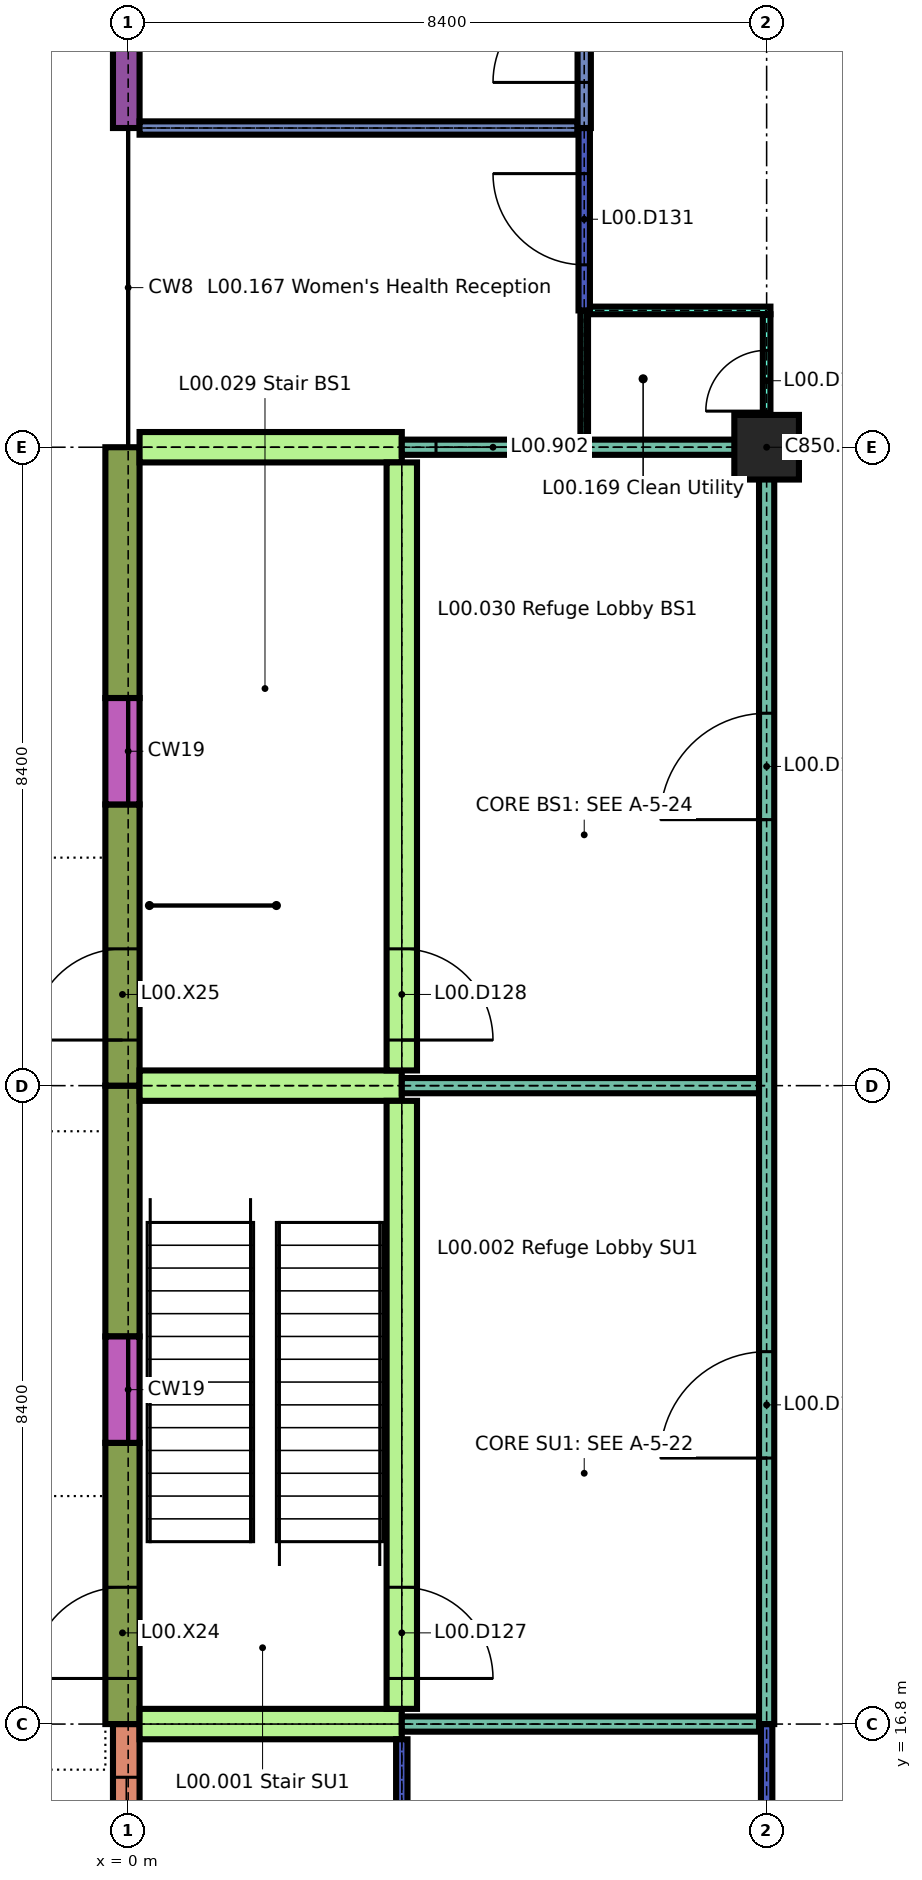
"""IFC4 building model, lengths in metres.
Left out: names, types, materials, properties, quantities, classifications, styles, units other than length and angle.
Written with IfcOpenShell. Run it as: python <this file> out.ifc"""

import sys

from ifc_helpers import new_model, si_unit, direction, frame, frame_2d, origin, origin_2d, place, context, subcontext, project, spatial, rectangle, extrude, element, fill, save


model = new_model("IFC4")
c1 = context("Model", 3, precision=1e-05, world=origin(), true_north=direction((0.0, 1.0)))
c2 = subcontext(c1, "Body", "Model", "MODEL_VIEW")
j1 = project(units=[si_unit("LENGTHUNIT", "METRE"), si_unit("PLANEANGLEUNIT", "RADIAN")], contexts=[c1])
p1 = place(None, origin())
s1 = spatial("IfcSite", under=j1, at=p1, CompositionType="ELEMENT")
p2 = place(p1, origin())
s2 = spatial("IfcBuilding", under=s1, at=p2, CompositionType="ELEMENT")
p3 = place(p2, origin())
s3 = spatial("IfcBuildingStorey", under=s2, at=p3, CompositionType="ELEMENT", Elevation=0.0)
p4 = place(p3, frame((-0.025, 12.6, 0.0), z_axis=(0.0, 0.0, 1.0), x_axis=(0.0, 1.0, 0.0)))
e1 = element("IfcWall", 1, at=p4, inside=s3, PredefinedType="SOLIDWALL", context=c2, shape_type="SweptSolid", body=[
    extrude(rectangle(XDim=4.2, YDim=0.35, at=frame_2d((2.1, 0.0))), origin(), (0.0, 0.0, 1.0), 4.14),
])
p5 = place(p4, frame((0.7, 0.0, 1.0)))
e2 = element("IfcOpeningElement", 2, at=p5, cuts=e1, PredefinedType="OPENING", context=c2, shape_type="SweptSolid", body=[
    extrude(rectangle(XDim=2.8, YDim=1.5, at=frame_2d((1.4, 0.75))), frame((0.0, 0.185, 0.0), z_axis=(0.0, -1.0, 0.0), x_axis=(1.0, 0.0, 0.0)), (0.0, 0.0, 1.0), 0.37),
])
p6 = place(p3, frame((-0.075, 16.8, 0.0), z_axis=(0.0, 0.0, 1.0), x_axis=(0.0, 1.0, 0.0)))
e3 = element("IfcWall", 3, at=p6, inside=s3, PredefinedType="SOLIDWALL", context=c2, shape_type="SweptSolid", body=[
    extrude(rectangle(XDim=3.7, YDim=0.45, at=frame_2d((1.85, 0.0))), origin(), (0.0, 0.0, 1.0), 4.14),
])
p7 = place(p6, frame((0.6, 0.0, 0.0)))
e4 = element("IfcOpeningElement", 4, at=p7, cuts=e3, PredefinedType="OPENING", context=c2, shape_type="SweptSolid", body=[
    extrude(rectangle(XDim=1.2, YDim=2.1, at=frame_2d((0.6, 1.05))), frame((0.0, 0.235, 0.0), z_axis=(0.0, -1.0, 0.0), x_axis=(1.0, 0.0, 0.0)), (0.0, 0.0, 1.0), 0.47),
])
p8 = place(p3, frame((-0.075, 21.9, 0.0), z_axis=(0.0, 0.0, 1.0), x_axis=(0.0, 1.0, 0.0)))
e5 = element("IfcWall", 5, at=p8, inside=s3, PredefinedType="SOLIDWALL", context=c2, shape_type="SweptSolid", body=[
    extrude(rectangle(XDim=3.3, YDim=0.45, at=frame_2d((1.65, 0.0))), origin(), (0.0, 0.0, 1.0), 4.14),
])
p9 = place(p3, frame((-0.075, 20.5, 0.0), z_axis=(0.0, 0.0, 1.0), x_axis=(0.0, 1.0, 0.0)))
e6 = element("IfcWall", 6, at=p9, inside=s3, PredefinedType="SOLIDWALL", context=c2, shape_type="SweptSolid", body=[
    extrude(rectangle(XDim=1.4, YDim=0.45, at=frame_2d((0.7, 0.0))), origin(), (0.0, 0.0, 1.0), 0.6),
])
p10 = place(p3, frame((-0.075, 25.2, 0.0), z_axis=(0.0, 0.0, 1.0), x_axis=(0.0, 1.0, 0.0)))
e7 = element("IfcWall", 7, at=p10, inside=s3, PredefinedType="SOLIDWALL", context=c2, shape_type="SweptSolid", body=[
    extrude(rectangle(XDim=3.7, YDim=0.45, at=frame_2d((1.85, 0.0))), origin(), (0.0, 0.0, 1.0), 4.14),
])
p11 = place(p10, frame((0.6, 0.0, 0.0)))
e8 = element("IfcOpeningElement", 8, at=p11, cuts=e7, PredefinedType="OPENING", context=c2, shape_type="SweptSolid", body=[
    extrude(rectangle(XDim=1.2, YDim=2.1, at=frame_2d((0.6, 1.05))), frame((0.0, 0.235, 0.0), z_axis=(0.0, -1.0, 0.0), x_axis=(1.0, 0.0, 0.0)), (0.0, 0.0, 1.0), 0.47),
])
p12 = place(p3, frame((-0.075, 30.3, 0.0), z_axis=(0.0, 0.0, 1.0), x_axis=(0.0, 1.0, 0.0)))
e9 = element("IfcWall", 9, at=p12, inside=s3, PredefinedType="SOLIDWALL", context=c2, shape_type="SweptSolid", body=[
    extrude(rectangle(XDim=3.3, YDim=0.45, at=frame_2d((1.65, 0.0))), origin(), (0.0, 0.0, 1.0), 4.14),
])
p13 = place(p3, frame((-0.075, 28.9, 0.0), z_axis=(0.0, 0.0, 1.0), x_axis=(0.0, 1.0, 0.0)))
e10 = element("IfcWall", 10, at=p13, inside=s3, PredefinedType="SOLIDWALL", context=c2, shape_type="SweptSolid", body=[
    extrude(rectangle(XDim=1.4, YDim=0.45, at=frame_2d((0.7, 0.0))), origin(), (0.0, 0.0, 1.0), 0.6),
])
p14 = place(p3, frame((-0.025, 37.8, 0.0), z_axis=(0.0, 0.0, 1.0), x_axis=(0.0, 1.0, 0.0)))
e11 = element("IfcWall", 11, at=p14, inside=s3, PredefinedType="SOLIDWALL", context=c2, shape_type="SweptSolid", body=[
    extrude(rectangle(XDim=3.775, YDim=0.35, at=frame_2d((1.887, 0.0))), origin(), (0.0, 0.0, 1.0), 3.84),
])
p15 = place(p14, frame((1.05, 0.0, 0.9)))
e12 = element("IfcOpeningElement", 12, at=p15, cuts=e11, PredefinedType="OPENING", context=c2, shape_type="SweptSolid", body=[
    extrude(rectangle(XDim=2.1, YDim=2.1, at=frame_2d((1.05, 1.05))), frame((0.0, 0.185, 0.0), z_axis=(0.0, -1.0, 0.0), x_axis=(1.0, 0.0, 0.0)), (0.0, 0.0, 1.0), 0.37),
])
p16 = place(p3, frame((0.15, 16.8, 0.0), z_axis=(0.0, 0.0, 1.0), x_axis=(1.0, 0.0, 0.0)))
e13 = element("IfcWall", 13, at=p16, inside=s3, PredefinedType="SHEAR", context=c2, shape_type="SweptSolid", body=[
    extrude(rectangle(XDim=3.45, YDim=0.4, at=frame_2d((1.725, 0.0))), origin(), (0.0, 0.0, 1.0), 4.14),
])
p17 = place(p3, frame((3.6, 16.8, 0.0), z_axis=(0.0, 0.0, 1.0), x_axis=(1.0, 0.0, 0.0)))
e14 = element("IfcWall", 14, at=p17, inside=s3, PredefinedType="PARTITIONING", context=c2, shape_type="SweptSolid", body=[
    extrude(rectangle(XDim=4.7, YDim=0.2, at=frame_2d((2.35, 0.0))), origin(), (0.0, 0.0, 1.0), 4.14),
])
p18 = place(p3, frame((0.15, 25.2, 0.0), z_axis=(0.0, 0.0, 1.0), x_axis=(1.0, 0.0, 0.0)))
e15 = element("IfcWall", 15, at=p18, inside=s3, PredefinedType="SHEAR", context=c2, shape_type="SweptSolid", body=[
    extrude(rectangle(XDim=3.45, YDim=0.4, at=frame_2d((1.725, 0.0))), origin(), (0.0, 0.0, 1.0), 4.14),
])
p19 = place(p3, frame((3.6, 25.2, 0.0), z_axis=(0.0, 0.0, 1.0), x_axis=(1.0, 0.0, 0.0)))
e16 = element("IfcWall", 16, at=p19, inside=s3, PredefinedType="PARTITIONING", context=c2, shape_type="SweptSolid", body=[
    extrude(rectangle(XDim=4.7, YDim=0.2, at=frame_2d((2.35, 0.0))), origin(), (0.0, 0.0, 1.0), 4.14),
])
p20 = place(p3, frame((0.15, 33.6, 0.0), z_axis=(0.0, 0.0, 1.0), x_axis=(1.0, 0.0, 0.0)))
e17 = element("IfcWall", 17, at=p20, inside=s3, PredefinedType="SHEAR", context=c2, shape_type="SweptSolid", body=[
    extrude(rectangle(XDim=3.45, YDim=0.4, at=frame_2d((1.725, 0.0))), origin(), (0.0, 0.0, 1.0), 4.14),
])
p21 = place(p3, frame((3.6, 33.6, 0.0), z_axis=(0.0, 0.0, 1.0), x_axis=(1.0, 0.0, 0.0)))
e18 = element("IfcWall", 18, at=p21, inside=s3, PredefinedType="PARTITIONING", context=c2, shape_type="SweptSolid", body=[
    extrude(rectangle(XDim=4.7, YDim=0.2, at=frame_2d((2.35, 0.0))), origin(), (0.0, 0.0, 1.0), 4.14),
])
p22 = place(p21, frame((0.45, 0.0, 0.9)))
e19 = element("IfcOpeningElement", 19, at=p22, cuts=e18, PredefinedType="OPENING", context=c2, shape_type="SweptSolid", body=[
    extrude(rectangle(XDim=1.5, YDim=1.0, at=frame_2d((0.75, 0.5))), frame((0.0, 0.11, 0.0), z_axis=(0.0, -1.0, 0.0), x_axis=(1.0, 0.0, 0.0)), (0.0, 0.0, 1.0), 0.22),
])
p23 = place(p3, frame((6.075, 35.4, 0.0), z_axis=(0.0, 0.0, 1.0), x_axis=(1.0, 0.0, 0.0)))
e20 = element("IfcWall", 20, at=p23, inside=s3, PredefinedType="PARTITIONING", context=c2, shape_type="SweptSolid", body=[
    extrude(rectangle(XDim=2.375, YDim=0.1, at=frame_2d((1.188, 0.0))), origin(), (0.0, 0.0, 1.0), 4.14),
])
p24 = place(p3, frame((0.15, 37.8, 0.0), z_axis=(0.0, 0.0, 1.0), x_axis=(1.0, 0.0, 0.0)))
e21 = element("IfcWall", 21, at=p24, inside=s3, PredefinedType="PARTITIONING", context=c2, shape_type="SweptSolid", body=[
    extrude(rectangle(XDim=5.763, YDim=0.175, at=frame_2d((2.881, 0.0))), origin(), (0.0, 0.0, 1.0), 4.14),
])
p25 = place(p3, frame((3.6, 12.675, 0.0), z_axis=(0.0, 0.0, 1.0), x_axis=(0.0, 1.0, 0.0)))
e22 = element("IfcWall", 22, at=p25, inside=s3, PredefinedType="PARTITIONING", context=c2, shape_type="SweptSolid", body=[
    extrude(rectangle(XDim=3.925, YDim=0.15, at=frame_2d((1.962, 0.0))), origin(), (0.0, 0.0, 1.0), 4.14),
])
p26 = place(p3, frame((3.6, 17.0, 0.0), z_axis=(0.0, 0.0, 1.0), x_axis=(0.0, 1.0, 0.0)))
e23 = element("IfcWall", 23, at=p26, inside=s3, PredefinedType="SHEAR", context=c2, shape_type="SweptSolid", body=[
    extrude(rectangle(XDim=8.0, YDim=0.4, at=frame_2d((4.0, 0.0))), origin(), (0.0, 0.0, 1.0), 4.14),
])
p27 = place(p26, frame((0.4, 0.0, 0.0)))
e24 = element("IfcOpeningElement", 24, at=p27, cuts=e23, PredefinedType="OPENING", context=c2, shape_type="SweptSolid", body=[
    extrude(rectangle(XDim=1.2, YDim=2.1, at=frame_2d((0.6, 1.05))), frame((0.0, 0.21, 0.0), z_axis=(0.0, -1.0, 0.0), x_axis=(1.0, 0.0, 0.0)), (0.0, 0.0, 1.0), 0.42),
])
p28 = place(p3, frame((3.6, 25.4, 0.0), z_axis=(0.0, 0.0, 1.0), x_axis=(0.0, 1.0, 0.0)))
e25 = element("IfcWall", 25, at=p28, inside=s3, PredefinedType="SHEAR", context=c2, shape_type="SweptSolid", body=[
    extrude(rectangle(XDim=8.0, YDim=0.4, at=frame_2d((4.0, 0.0))), origin(), (0.0, 0.0, 1.0), 4.14),
])
p29 = place(p28, frame((0.4, 0.0, 0.0)))
e26 = element("IfcOpeningElement", 26, at=p29, cuts=e25, PredefinedType="OPENING", context=c2, shape_type="SweptSolid", body=[
    extrude(rectangle(XDim=1.2, YDim=2.1, at=frame_2d((0.6, 1.05))), frame((0.0, 0.21, 0.0), z_axis=(0.0, -1.0, 0.0), x_axis=(1.0, 0.0, 0.0)), (0.0, 0.0, 1.0), 0.42),
])
p30 = place(p3, frame((6.0, 33.7, 0.0), z_axis=(0.0, 0.0, 1.0), x_axis=(0.0, 1.0, 0.0)))
e27 = element("IfcWall", 27, at=p30, inside=s3, PredefinedType="PARTITIONING", context=c2, shape_type="SweptSolid", body=[
    extrude(rectangle(XDim=1.7, YDim=0.1, at=frame_2d((0.85, 0.0))), origin(), (0.0, 0.0, 1.0), 4.14),
])
p31 = place(p3, frame((6.0, 35.4, 0.0), z_axis=(0.0, 0.0, 1.0), x_axis=(0.0, 1.0, 0.0)))
e28 = element("IfcWall", 28, at=p31, inside=s3, PredefinedType="PARTITIONING", context=c2, shape_type="SweptSolid", body=[
    extrude(rectangle(XDim=2.4, YDim=0.15, at=frame_2d((1.2, 0.0))), origin(), (0.0, 0.0, 1.0), 4.14),
])
p32 = place(p31, frame((0.6, 0.0, 0.0)))
e29 = element("IfcOpeningElement", 29, at=p32, cuts=e28, PredefinedType="OPENING", context=c2, shape_type="SweptSolid", body=[
    extrude(rectangle(XDim=1.2, YDim=2.1, at=frame_2d((0.6, 1.05))), frame((0.0, 0.085, 0.0), z_axis=(0.0, -1.0, 0.0), x_axis=(1.0, 0.0, 0.0)), (0.0, 0.0, 1.0), 0.17),
])
p33 = place(p3, frame((6.0, 37.8, 0.0), z_axis=(0.0, 0.0, 1.0), x_axis=(0.0, 1.0, 0.0)))
e30 = element("IfcWall", 30, at=p33, inside=s3, PredefinedType="PARTITIONING", context=c2, shape_type="SweptSolid", body=[
    extrude(rectangle(XDim=2.4, YDim=0.175, at=frame_2d((1.2, 0.0))), origin(), (0.0, 0.0, 1.0), 4.14),
])
p34 = place(p33, frame((0.6, 0.0, 0.0)))
e31 = element("IfcOpeningElement", 31, at=p34, cuts=e30, PredefinedType="OPENING", context=c2, shape_type="SweptSolid", body=[
    extrude(rectangle(XDim=1.2, YDim=2.1, at=frame_2d((0.6, 1.05))), frame((0.0, 0.097, 0.0), z_axis=(0.0, -1.0, 0.0), x_axis=(1.0, 0.0, 0.0)), (0.0, 0.0, 1.0), 0.195),
])
p35 = place(p3, frame((8.4, 8.6, 0.0), z_axis=(0.0, 0.0, 1.0), x_axis=(0.0, 1.0, 0.0)))
e32 = element("IfcWall", 32, at=p35, inside=s3, PredefinedType="PARTITIONING", context=c2, shape_type="SweptSolid", body=[
    extrude(rectangle(XDim=8.2, YDim=0.15, at=frame_2d((4.1, 0.0))), origin(), (0.0, 0.0, 1.0), 4.14),
])
p36 = place(p35, frame((3.4, 0.0, 0.0)))
e33 = element("IfcOpeningElement", 33, at=p36, cuts=e32, PredefinedType="OPENING", context=c2, shape_type="SweptSolid", body=[
    extrude(rectangle(XDim=1.4, YDim=2.1, at=frame_2d((0.7, 1.05))), frame((0.0, 0.085, 0.0), z_axis=(0.0, -1.0, 0.0), x_axis=(1.0, 0.0, 0.0)), (0.0, 0.0, 1.0), 0.17),
])
p37 = place(p3, frame((8.4, 16.8, 0.0), z_axis=(0.0, 0.0, 1.0), x_axis=(0.0, 1.0, 0.0)))
e34 = element("IfcWall", 34, at=p37, inside=s3, PredefinedType="PARTITIONING", context=c2, shape_type="SweptSolid", body=[
    extrude(rectangle(XDim=16.8, YDim=0.2, at=frame_2d((8.4, 0.0))), origin(), (0.0, 0.0, 1.0), 4.14),
])
p38 = place(p37, frame((3.5, 0.0, 0.0)))
e35 = element("IfcOpeningElement", 35, at=p38, cuts=e34, PredefinedType="OPENING", context=c2, shape_type="SweptSolid", body=[
    extrude(rectangle(XDim=1.4, YDim=2.1, at=frame_2d((0.7, 1.05))), frame((0.0, 0.11, 0.0), z_axis=(0.0, -1.0, 0.0), x_axis=(1.0, 0.0, 0.0)), (0.0, 0.0, 1.0), 0.22),
])
p39 = place(p37, frame((11.9, 0.0, 0.0)))
e36 = element("IfcOpeningElement", 36, at=p39, cuts=e34, PredefinedType="OPENING", context=c2, shape_type="SweptSolid", body=[
    extrude(rectangle(XDim=1.4, YDim=2.1, at=frame_2d((0.7, 1.05))), frame((0.0, 0.11, 0.0), z_axis=(0.0, -1.0, 0.0), x_axis=(1.0, 0.0, 0.0)), (0.0, 0.0, 1.0), 0.22),
])
p40 = place(p3, frame((8.4, 33.6, 0.0), z_axis=(0.0, 0.0, 1.0), x_axis=(0.0, 1.0, 0.0)))
e37 = element("IfcWall", 37, at=p40, inside=s3, PredefinedType="PARTITIONING", context=c2, shape_type="SweptSolid", body=[
    extrude(rectangle(XDim=1.75, YDim=0.1, at=frame_2d((0.875, 0.0))), origin(), (0.0, 0.0, 1.0), 4.14),
])
p41 = place(p40, frame((0.475, 0.0, 0.0)))
e38 = element("IfcOpeningElement", 38, at=p41, cuts=e37, PredefinedType="OPENING", context=c2, shape_type="SweptSolid", body=[
    extrude(rectangle(XDim=0.8, YDim=2.1, at=frame_2d((0.4, 1.05))), frame((0.0, 0.06, 0.0), z_axis=(0.0, -1.0, 0.0), x_axis=(1.0, 0.0, 0.0)), (0.0, 0.0, 1.0), 0.12),
])
p42 = place(p3, frame((8.4, 33.6, 0.0), z_axis=(0.0, 0.0, 1.0), x_axis=(1.0, 0.0, 0.0)))
e39 = element("IfcColumn", 39, at=p42, inside=s3, PredefinedType="COLUMN", context=c2, shape_type="SweptSolid", body=[
    extrude(rectangle(XDim=0.85, YDim=0.85, at=origin_2d()), origin(), (0.0, 0.0, 1.0), 4.14),
])
p43 = place(p5, origin())
e40 = element("IfcWindow", 40, at=p43, inside=s3, PartitioningType="DOUBLE_PANEL_VERTICAL", PredefinedType="WINDOW", context=c2, shape_type="SweptSolid", body=[
    extrude(rectangle(XDim=2.8, YDim=1.5, at=frame_2d((1.4, 0.75))), frame((0.0, 0.03, 0.0), z_axis=(0.0, -1.0, 0.0), x_axis=(1.0, 0.0, 0.0)), (0.0, 0.0, 1.0), 0.06),
])
fill(e2, e40)
p44 = place(p7, origin())
e41 = element("IfcDoor", 41, at=p44, inside=s3, OperationType="SINGLE_SWING_RIGHT", PredefinedType="DOOR", context=c2, shape_type="SweptSolid", body=[
    extrude(rectangle(XDim=1.2, YDim=2.1, at=frame_2d((0.6, 1.05))), frame((0.0, 0.025, 0.0), z_axis=(0.0, -1.0, 0.0), x_axis=(1.0, 0.0, 0.0)), (0.0, 0.0, 1.0), 0.05),
])
fill(e4, e41)
p45 = place(p11, origin())
e42 = element("IfcDoor", 42, at=p45, inside=s3, OperationType="SINGLE_SWING_RIGHT", PredefinedType="DOOR", context=c2, shape_type="SweptSolid", body=[
    extrude(rectangle(XDim=1.2, YDim=2.1, at=frame_2d((0.6, 1.05))), frame((0.0, 0.025, 0.0), z_axis=(0.0, -1.0, 0.0), x_axis=(1.0, 0.0, 0.0)), (0.0, 0.0, 1.0), 0.05),
])
fill(e8, e42)
p46 = place(p27, origin())
e43 = element("IfcDoor", 43, at=p46, inside=s3, OperationType="SINGLE_SWING_LEFT", PredefinedType="DOOR", context=c2, shape_type="SweptSolid", body=[
    extrude(rectangle(XDim=1.2, YDim=2.1, at=frame_2d((0.6, 1.05))), frame((0.0, 0.025, 0.0), z_axis=(0.0, -1.0, 0.0), x_axis=(1.0, 0.0, 0.0)), (0.0, 0.0, 1.0), 0.05),
])
fill(e24, e43)
p47 = place(p29, origin())
e44 = element("IfcDoor", 44, at=p47, inside=s3, OperationType="SINGLE_SWING_LEFT", PredefinedType="DOOR", context=c2, shape_type="SweptSolid", body=[
    extrude(rectangle(XDim=1.2, YDim=2.1, at=frame_2d((0.6, 1.05))), frame((0.0, 0.025, 0.0), z_axis=(0.0, -1.0, 0.0), x_axis=(1.0, 0.0, 0.0)), (0.0, 0.0, 1.0), 0.05),
])
fill(e26, e44)
p48 = place(p32, origin())
e45 = element("IfcDoor", 45, at=p48, inside=s3, OperationType="SINGLE_SWING_LEFT", PredefinedType="DOOR", context=c2, shape_type="SweptSolid", body=[
    extrude(rectangle(XDim=1.2, YDim=2.1, at=frame_2d((0.6, 1.05))), frame((0.0, 0.025, 0.0), z_axis=(0.0, -1.0, 0.0), x_axis=(1.0, 0.0, 0.0)), (0.0, 0.0, 1.0), 0.05),
])
fill(e29, e45)
p49 = place(p34, origin())
e46 = element("IfcDoor", 46, at=p49, inside=s3, OperationType="SINGLE_SWING_RIGHT", PredefinedType="DOOR", context=c2, shape_type="SweptSolid", body=[
    extrude(rectangle(XDim=1.2, YDim=2.1, at=frame_2d((0.6, 1.05))), frame((0.0, 0.035, 0.0), z_axis=(0.0, -1.0, 0.0), x_axis=(1.0, 0.0, 0.0)), (0.0, 0.0, 1.0), 0.07),
])
fill(e31, e46)
p50 = place(p38, origin())
e47 = element("IfcDoor", 47, at=p50, inside=s3, OperationType="SINGLE_SWING_RIGHT", PredefinedType="DOOR", context=c2, shape_type="SweptSolid", body=[
    extrude(rectangle(XDim=1.4, YDim=2.1, at=frame_2d((0.7, 1.05))), frame((0.0, 0.03, 0.0), z_axis=(0.0, -1.0, 0.0), x_axis=(1.0, 0.0, 0.0)), (0.0, 0.0, 1.0), 0.06),
])
fill(e35, e47)
p51 = place(p39, origin())
e48 = element("IfcDoor", 48, at=p51, inside=s3, OperationType="SINGLE_SWING_RIGHT", PredefinedType="DOOR", context=c2, shape_type="SweptSolid", body=[
    extrude(rectangle(XDim=1.4, YDim=2.1, at=frame_2d((0.7, 1.05))), frame((0.0, 0.03, 0.0), z_axis=(0.0, -1.0, 0.0), x_axis=(1.0, 0.0, 0.0)), (0.0, 0.0, 1.0), 0.06),
])
fill(e36, e48)
p52 = place(p41, origin())
e49 = element("IfcDoor", 49, at=p52, inside=s3, OperationType="SINGLE_SWING_RIGHT", PredefinedType="DOOR", context=c2, shape_type="SweptSolid", body=[
    extrude(rectangle(XDim=0.8, YDim=2.1, at=frame_2d((0.4, 1.05))), frame((0.0, 0.02, 0.0), z_axis=(0.0, -1.0, 0.0), x_axis=(1.0, 0.0, 0.0)), (0.0, 0.0, 1.0), 0.04),
])
fill(e38, e49)
p53 = place(p22, origin())
e50 = element("IfcWindow", 50, at=p53, inside=s3, PartitioningType="DOUBLE_PANEL_HORIZONTAL", PredefinedType="WINDOW", context=c2, shape_type="SweptSolid", body=[
    extrude(rectangle(XDim=1.5, YDim=1.0, at=frame_2d((0.75, 0.5))), frame((0.0, 0.025, 0.0), z_axis=(0.0, -1.0, 0.0), x_axis=(1.0, 0.0, 0.0)), (0.0, 0.0, 1.0), 0.05),
])
fill(e19, e50)
save(model, sys.argv[1])
